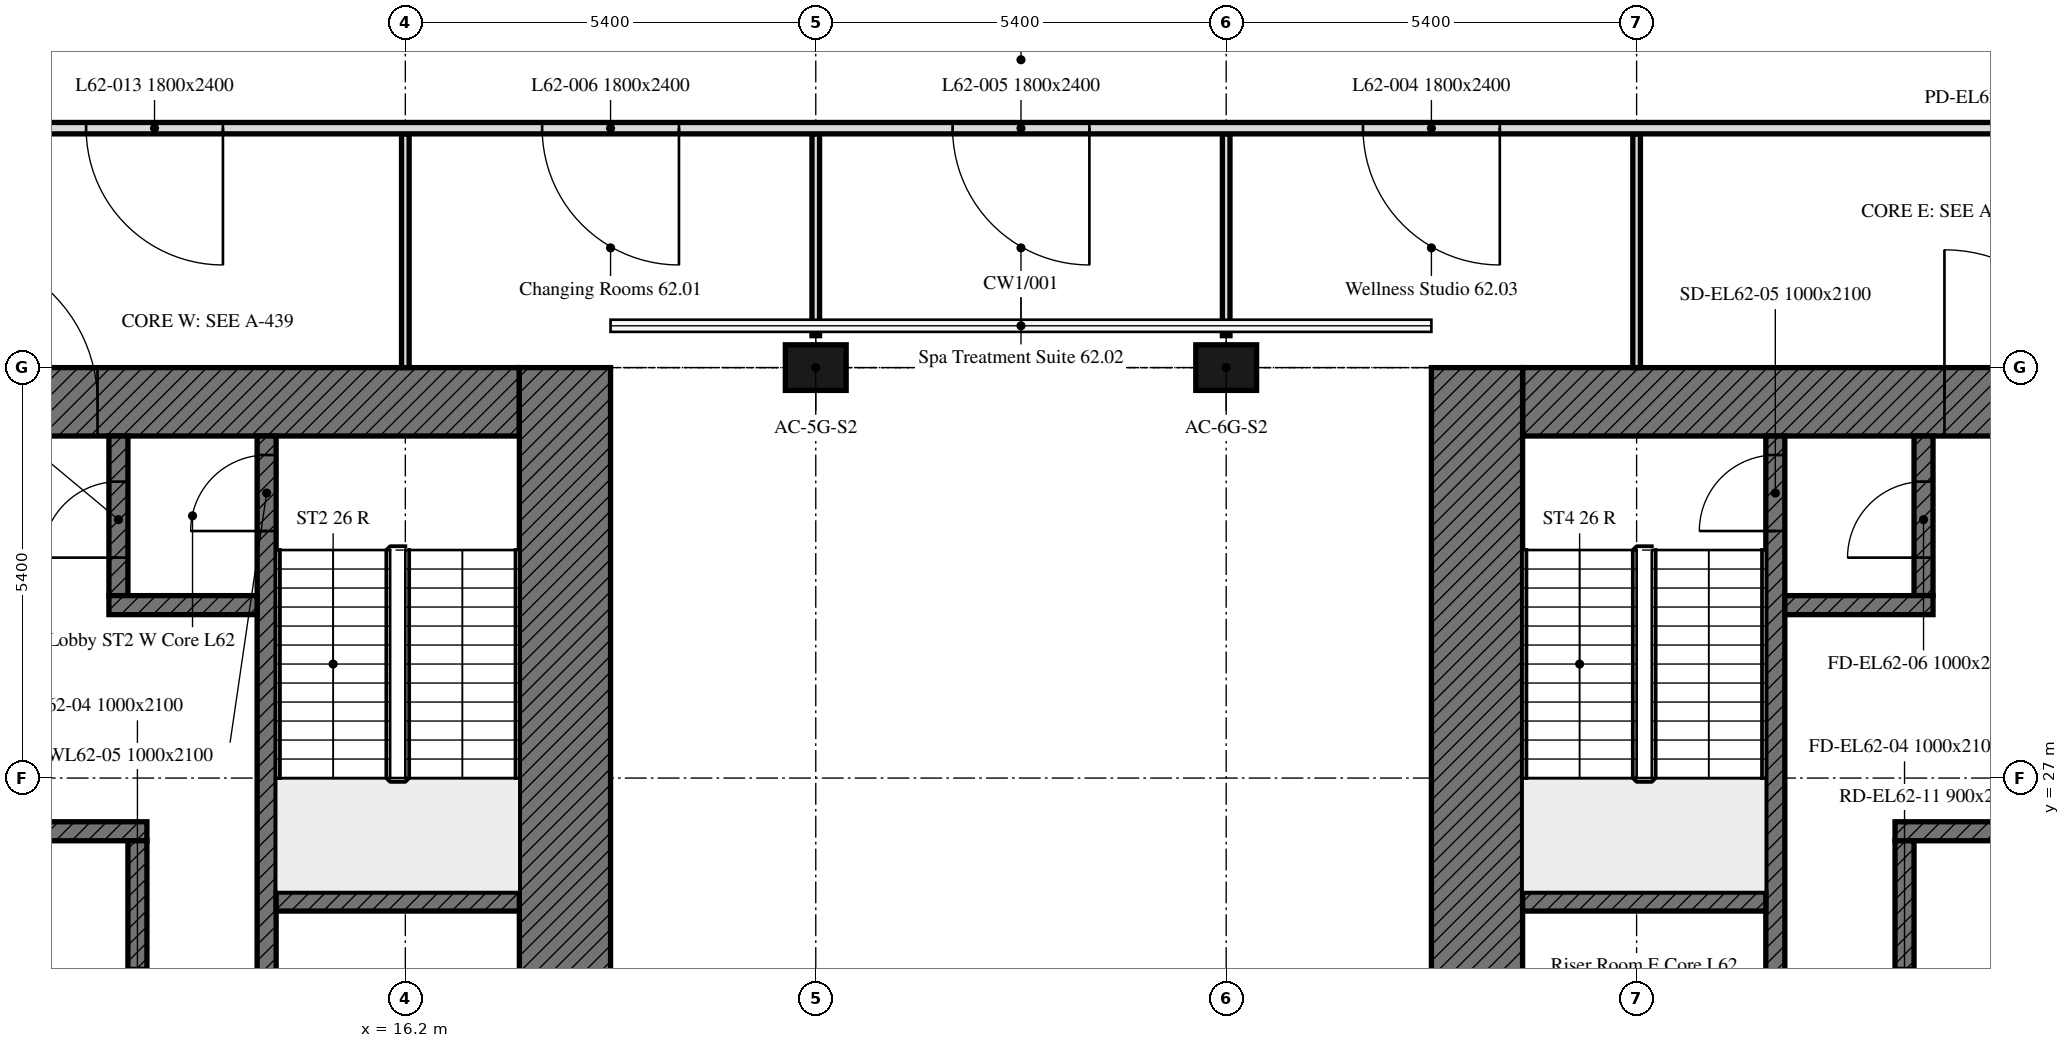
"""IFC4 building model, lengths in metres.
Left out: names, types, materials, properties, quantities, classifications, styles, units other than length and angle.
Written with IfcOpenShell. Run it as: python <this file> out.ifc"""

import sys

from ifc_helpers import new_model, si_unit, direction, frame, frame_2d, origin, origin_2d, place, context, subcontext, project, spatial, rectangle, extrude, element, fill, save


model = new_model("IFC4")
c1 = context("Model", 3, precision=1e-05, world=origin(), true_north=direction((0.0, 1.0)))
c2 = subcontext(c1, "Body", "Model", "MODEL_VIEW")
j1 = project(units=[si_unit("LENGTHUNIT", "METRE"), si_unit("PLANEANGLEUNIT", "RADIAN")], contexts=[c1])
p1 = place(None, origin())
s1 = spatial("IfcSite", under=j1, at=p1, CompositionType="ELEMENT")
p2 = place(p1, origin())
s2 = spatial("IfcBuilding", under=s1, at=p2, CompositionType="ELEMENT")
p3 = place(p2, frame((0.0, 0.0, 255.7)))
s3 = spatial("IfcBuildingStorey", under=s2, at=p3, CompositionType="ELEMENT", Elevation=255.7)
for number, where, z_axis, x_axis in (
    (1, (21.6, 32.4, 0.0), (0.0, 0.0, 1.0), (1.0, 0.0, 0.0)),
    (2, (27.0, 32.4, 0.0), (0.0, 0.0, 1.0), (1.0, 0.0, 0.0)),
):
    element("IfcColumn", number, at=place(p3, frame(where, z_axis=z_axis, x_axis=x_axis)), inside=s3, PredefinedType="COLUMN", context=c2, shape_type="SweptSolid", body=[
        extrude(rectangle(XDim=0.8, YDim=0.6, at=origin_2d()), origin(), (0.0, 0.0, 1.0), 4.5),
    ])
p4 = place(p3, frame((6.6, 31.95, 0.0), z_axis=(0.0, 0.0, 1.0), x_axis=(1.0, 0.0, 0.0)))
e3 = element("IfcWall", 3, at=p4, inside=s3, PredefinedType="SOLIDWALL", context=c2, shape_type="SweptSolid", body=[
    extrude(rectangle(XDim=11.1, YDim=0.9, at=frame_2d((5.55, 0.0))), origin(), (0.0, 0.0, 1.0), 4.5),
])
p5 = place(p4, frame((3.55, 0.0, 0.0)))
e4 = element("IfcOpeningElement", 4, at=p5, cuts=e3, PredefinedType="OPENING", context=c2, shape_type="SweptSolid", body=[
    extrude(rectangle(XDim=2.0, YDim=2.4, at=frame_2d((1.0, 1.2))), frame((0.0, 0.45, 0.0), z_axis=(0.0, -1.0, 0.0), x_axis=(1.0, 0.0, 0.0)), (0.0, 0.0, 1.0), 0.9),
])
p6 = place(p3, frame((18.3, 32.4, 0.0), z_axis=(0.0, 0.0, 1.0), x_axis=(0.0, -1.0, 0.0)))
e5 = element("IfcWall", 5, at=p6, inside=s3, PredefinedType="SOLIDWALL", context=c2, shape_type="SweptSolid", body=[
    extrude(rectangle(XDim=16.2, YDim=1.2, at=frame_2d((8.1, 0.0))), origin(), (0.0, 0.0, 1.0), 4.5),
])
p7 = place(p3, frame((14.375, 17.1, 0.0), z_axis=(0.0, 0.0, 1.0), x_axis=(0.0, 1.0, 0.0)))
e6 = element("IfcWall", 6, at=p7, inside=s3, PredefinedType="SOLIDWALL", context=c2, shape_type="SweptSolid", body=[
    extrude(rectangle(XDim=14.4, YDim=0.25, at=frame_2d((7.2, 0.0))), origin(), (0.0, 0.0, 1.0), 4.5),
])
p8 = place(p7, frame((13.15, 0.0, 0.0)))
e7 = element("IfcOpeningElement", 7, at=p8, cuts=e6, PredefinedType="OPENING", context=c2, shape_type="SweptSolid", body=[
    extrude(rectangle(XDim=1.0, YDim=2.1, at=frame_2d((0.5, 1.05))), frame((0.0, 0.125, 0.0), z_axis=(0.0, -1.0, 0.0), x_axis=(1.0, 0.0, 0.0)), (0.0, 0.0, 1.0), 0.25),
])
p9 = place(p7, frame((3.15, 0.0, 0.0)))
e8 = element("IfcOpeningElement", 8, at=p9, cuts=e6, PredefinedType="OPENING", context=c2, shape_type="SweptSolid", body=[
    extrude(rectangle(XDim=1.1, YDim=2.1, at=frame_2d((0.55, 1.05))), frame((0.0, 0.125, 0.0), z_axis=(0.0, -1.0, 0.0), x_axis=(1.0, 0.0, 0.0)), (0.0, 0.0, 1.0), 0.25),
])
p10 = place(p7, frame((0.7, 0.0, 0.0)))
e9 = element("IfcOpeningElement", 9, at=p10, cuts=e6, PredefinedType="OPENING", context=c2, shape_type="SweptSolid", body=[
    extrude(rectangle(XDim=0.9, YDim=2.1, at=frame_2d((0.45, 1.05))), frame((0.0, 0.125, 0.0), z_axis=(0.0, -1.0, 0.0), x_axis=(1.0, 0.0, 0.0)), (0.0, 0.0, 1.0), 0.25),
])
p11 = place(p7, frame((6.175, 0.0, 0.0)))
e10 = element("IfcOpeningElement", 10, at=p11, cuts=e6, PredefinedType="OPENING", context=c2, shape_type="SweptSolid", body=[
    extrude(rectangle(XDim=0.9, YDim=2.1, at=frame_2d((0.45, 1.05))), frame((0.0, 0.125, 0.0), z_axis=(0.0, -1.0, 0.0), x_axis=(1.0, 0.0, 0.0)), (0.0, 0.0, 1.0), 0.25),
])
p12 = place(p3, frame((14.5, 25.375, 0.0), z_axis=(0.0, 0.0, 1.0), x_axis=(1.0, 0.0, 0.0)))
e11 = element("IfcWall", 11, at=p12, inside=s3, PredefinedType="SOLIDWALL", context=c2, shape_type="SweptSolid", body=[
    extrude(rectangle(XDim=3.2, YDim=0.25, at=frame_2d((1.6, 0.0))), origin(), (0.0, 0.0, 1.0), 4.5),
])
p13 = place(p3, frame((10.05, 26.3, 0.0), z_axis=(0.0, 0.0, 1.0), x_axis=(1.0, 0.0, 0.0)))
e12 = element("IfcWall", 12, at=p13, inside=s3, PredefinedType="SOLIDWALL", context=c2, shape_type="SweptSolid", body=[
    extrude(rectangle(XDim=2.75, YDim=0.25, at=frame_2d((1.375, 0.0))), origin(), (0.0, 0.0, 1.0), 4.5),
])
p14 = place(p3, frame((12.425, 29.4, 0.0), z_axis=(0.0, 0.0, 1.0), x_axis=(0.0, 1.0, 0.0)))
e13 = element("IfcWall", 13, at=p14, inside=s3, PredefinedType="SOLIDWALL", context=c2, shape_type="SweptSolid", body=[
    extrude(rectangle(XDim=2.1, YDim=0.25, at=frame_2d((1.05, 0.0))), origin(), (0.0, 0.0, 1.0), 4.5),
])
p15 = place(p14, frame((0.5, 0.0, 0.0)))
e14 = element("IfcOpeningElement", 14, at=p15, cuts=e13, PredefinedType="OPENING", context=c2, shape_type="SweptSolid", body=[
    extrude(rectangle(XDim=1.0, YDim=2.1, at=frame_2d((0.5, 1.05))), frame((0.0, 0.125, 0.0), z_axis=(0.0, -1.0, 0.0), x_axis=(1.0, 0.0, 0.0)), (0.0, 0.0, 1.0), 0.25),
])
p16 = place(p3, frame((12.3, 29.275, 0.0), z_axis=(0.0, 0.0, 1.0), x_axis=(1.0, 0.0, 0.0)))
e15 = element("IfcWall", 15, at=p16, inside=s3, PredefinedType="SOLIDWALL", context=c2, shape_type="SweptSolid", body=[
    extrude(rectangle(XDim=1.95, YDim=0.25, at=frame_2d((0.975, 0.0))), origin(), (0.0, 0.0, 1.0), 4.5),
])
p17 = place(p3, frame((12.675, 20.55, 0.0), z_axis=(0.0, 0.0, 1.0), x_axis=(0.0, 1.0, 0.0)))
e16 = element("IfcWall", 16, at=p17, inside=s3, PredefinedType="SOLIDWALL", context=c2, shape_type="SweptSolid", body=[
    extrude(rectangle(XDim=5.625, YDim=0.25, at=frame_2d((2.812, 0.0))), origin(), (0.0, 0.0, 1.0), 4.5),
])
p18 = place(p17, frame((2.95, 0.0, 0.0)))
e17 = element("IfcOpeningElement", 17, at=p18, cuts=e16, PredefinedType="OPENING", context=c2, shape_type="SweptSolid", body=[
    extrude(rectangle(XDim=1.0, YDim=2.1, at=frame_2d((0.5, 1.05))), frame((0.0, 0.125, 0.0), z_axis=(0.0, -1.0, 0.0), x_axis=(1.0, 0.0, 0.0)), (0.0, 0.0, 1.0), 0.25),
])
p19 = place(p3, frame((30.9, 31.95, 0.0), z_axis=(0.0, 0.0, 1.0), x_axis=(1.0, 0.0, 0.0)))
e18 = element("IfcWall", 18, at=p19, inside=s3, PredefinedType="SOLIDWALL", context=c2, shape_type="SweptSolid", body=[
    extrude(rectangle(XDim=11.1, YDim=0.9, at=frame_2d((5.55, 0.0))), origin(), (0.0, 0.0, 1.0), 4.5),
])
p20 = place(p19, frame((5.55, 0.0, 0.0)))
e19 = element("IfcOpeningElement", 19, at=p20, cuts=e18, PredefinedType="OPENING", context=c2, shape_type="SweptSolid", body=[
    extrude(rectangle(XDim=2.0, YDim=2.4, at=frame_2d((1.0, 1.2))), frame((0.0, 0.45, 0.0), z_axis=(0.0, -1.0, 0.0), x_axis=(1.0, 0.0, 0.0)), (0.0, 0.0, 1.0), 0.9),
])
p21 = place(p3, frame((30.3, 16.2, 0.0), z_axis=(0.0, 0.0, 1.0), x_axis=(0.0, 1.0, 0.0)))
e20 = element("IfcWall", 20, at=p21, inside=s3, PredefinedType="SOLIDWALL", context=c2, shape_type="SweptSolid", body=[
    extrude(rectangle(XDim=16.2, YDim=1.2, at=frame_2d((8.1, 0.0))), origin(), (0.0, 0.0, 1.0), 4.5),
])
p22 = place(p3, frame((34.225, 17.1, 0.0), z_axis=(0.0, 0.0, 1.0), x_axis=(0.0, 1.0, 0.0)))
e21 = element("IfcWall", 21, at=p22, inside=s3, PredefinedType="SOLIDWALL", context=c2, shape_type="SweptSolid", body=[
    extrude(rectangle(XDim=14.4, YDim=0.25, at=frame_2d((7.2, 0.0))), origin(), (0.0, 0.0, 1.0), 4.5),
])
p23 = place(p22, frame((13.15, 0.0, 0.0)))
e22 = element("IfcOpeningElement", 22, at=p23, cuts=e21, PredefinedType="OPENING", context=c2, shape_type="SweptSolid", body=[
    extrude(rectangle(XDim=1.0, YDim=2.1, at=frame_2d((0.5, 1.05))), frame((0.0, 0.125, 0.0), z_axis=(0.0, -1.0, 0.0), x_axis=(1.0, 0.0, 0.0)), (0.0, 0.0, 1.0), 0.25),
])
p24 = place(p22, frame((3.15, 0.0, 0.0)))
e23 = element("IfcOpeningElement", 23, at=p24, cuts=e21, PredefinedType="OPENING", context=c2, shape_type="SweptSolid", body=[
    extrude(rectangle(XDim=1.1, YDim=2.1, at=frame_2d((0.55, 1.05))), frame((0.0, 0.125, 0.0), z_axis=(0.0, -1.0, 0.0), x_axis=(1.0, 0.0, 0.0)), (0.0, 0.0, 1.0), 0.25),
])
p25 = place(p22, frame((0.7, 0.0, 0.0)))
e24 = element("IfcOpeningElement", 24, at=p25, cuts=e21, PredefinedType="OPENING", context=c2, shape_type="SweptSolid", body=[
    extrude(rectangle(XDim=0.9, YDim=2.1, at=frame_2d((0.45, 1.05))), frame((0.0, 0.125, 0.0), z_axis=(0.0, -1.0, 0.0), x_axis=(1.0, 0.0, 0.0)), (0.0, 0.0, 1.0), 0.25),
])
p26 = place(p22, frame((6.175, 0.0, 0.0)))
e25 = element("IfcOpeningElement", 25, at=p26, cuts=e21, PredefinedType="OPENING", context=c2, shape_type="SweptSolid", body=[
    extrude(rectangle(XDim=0.9, YDim=2.1, at=frame_2d((0.45, 1.05))), frame((0.0, 0.125, 0.0), z_axis=(0.0, -1.0, 0.0), x_axis=(1.0, 0.0, 0.0)), (0.0, 0.0, 1.0), 0.25),
])
p27 = place(p3, frame((30.9, 25.375, 0.0), z_axis=(0.0, 0.0, 1.0), x_axis=(1.0, 0.0, 0.0)))
e26 = element("IfcWall", 26, at=p27, inside=s3, PredefinedType="SOLIDWALL", context=c2, shape_type="SweptSolid", body=[
    extrude(rectangle(XDim=3.2, YDim=0.25, at=frame_2d((1.6, 0.0))), origin(), (0.0, 0.0, 1.0), 4.5),
])
p28 = place(p3, frame((35.8, 26.3, 0.0), z_axis=(0.0, 0.0, 1.0), x_axis=(1.0, 0.0, 0.0)))
e27 = element("IfcWall", 27, at=p28, inside=s3, PredefinedType="SOLIDWALL", context=c2, shape_type="SweptSolid", body=[
    extrude(rectangle(XDim=2.75, YDim=0.25, at=frame_2d((1.375, 0.0))), origin(), (0.0, 0.0, 1.0), 4.5),
])
p29 = place(p3, frame((36.175, 29.4, 0.0), z_axis=(0.0, 0.0, 1.0), x_axis=(0.0, 1.0, 0.0)))
e28 = element("IfcWall", 28, at=p29, inside=s3, PredefinedType="SOLIDWALL", context=c2, shape_type="SweptSolid", body=[
    extrude(rectangle(XDim=2.1, YDim=0.25, at=frame_2d((1.05, 0.0))), origin(), (0.0, 0.0, 1.0), 4.5),
])
p30 = place(p29, frame((0.5, 0.0, 0.0)))
e29 = element("IfcOpeningElement", 29, at=p30, cuts=e28, PredefinedType="OPENING", context=c2, shape_type="SweptSolid", body=[
    extrude(rectangle(XDim=1.0, YDim=2.1, at=frame_2d((0.5, 1.05))), frame((0.0, 0.125, 0.0), z_axis=(0.0, -1.0, 0.0), x_axis=(1.0, 0.0, 0.0)), (0.0, 0.0, 1.0), 0.25),
])
p31 = place(p3, frame((34.35, 29.275, 0.0), z_axis=(0.0, 0.0, 1.0), x_axis=(1.0, 0.0, 0.0)))
e30 = element("IfcWall", 30, at=p31, inside=s3, PredefinedType="SOLIDWALL", context=c2, shape_type="SweptSolid", body=[
    extrude(rectangle(XDim=1.95, YDim=0.25, at=frame_2d((0.975, 0.0))), origin(), (0.0, 0.0, 1.0), 4.5),
])
p32 = place(p3, frame((35.925, 20.55, 0.0), z_axis=(0.0, 0.0, 1.0), x_axis=(0.0, 1.0, 0.0)))
e31 = element("IfcWall", 31, at=p32, inside=s3, PredefinedType="SOLIDWALL", context=c2, shape_type="SweptSolid", body=[
    extrude(rectangle(XDim=5.625, YDim=0.25, at=frame_2d((2.812, 0.0))), origin(), (0.0, 0.0, 1.0), 4.5),
])
p33 = place(p32, frame((2.95, 0.0, 0.0)))
e32 = element("IfcOpeningElement", 32, at=p33, cuts=e31, PredefinedType="OPENING", context=c2, shape_type="SweptSolid", body=[
    extrude(rectangle(XDim=1.0, YDim=2.1, at=frame_2d((0.5, 1.05))), frame((0.0, 0.125, 0.0), z_axis=(0.0, -1.0, 0.0), x_axis=(1.0, 0.0, 0.0)), (0.0, 0.0, 1.0), 0.25),
])
p34 = place(p3, frame((32.4, 32.4, 0.0), z_axis=(0.0, 0.0, 1.0), x_axis=(0.0, 1.0, 0.0)))
e33 = element("IfcWall", 33, at=p34, inside=s3, PredefinedType="PARTITIONING", context=c2, shape_type="SweptSolid", body=[
    extrude(rectangle(XDim=3.075, YDim=0.1, at=frame_2d((1.538, 0.0))), origin(), (0.0, 0.0, 1.0), 4.5),
])
for number, where, z_axis, x_axis in (
    (34, (27.0, 35.475, 0.0), (0.0, 0.0, 1.0), (0.0, -1.0, 0.0)),
    (35, (21.6, 35.475, 0.0), (0.0, 0.0, 1.0), (0.0, -1.0, 0.0)),
):
    element("IfcWall", number, at=place(p3, frame(where, z_axis=z_axis, x_axis=x_axis)), inside=s3, PredefinedType="PARTITIONING", context=c2, shape_type="SweptSolid", body=[
        extrude(rectangle(XDim=2.655, YDim=0.1, at=frame_2d((1.328, 0.0))), origin(), (0.0, 0.0, 1.0), 4.5),
    ])
p35 = place(p3, frame((16.2, 35.475, 0.0), z_axis=(0.0, 0.0, 1.0), x_axis=(0.0, -1.0, 0.0)))
e36 = element("IfcWall", 36, at=p35, inside=s3, PredefinedType="PARTITIONING", context=c2, shape_type="SweptSolid", body=[
    extrude(rectangle(XDim=3.075, YDim=0.1, at=frame_2d((1.538, 0.0))), origin(), (0.0, 0.0, 1.0), 4.5),
])
p36 = place(p3, frame((42.6, 35.55, 0.0), z_axis=(0.0, 0.0, 1.0), x_axis=(-1.0, 0.0, 0.0)))
e37 = element("IfcWall", 37, at=p36, inside=s3, PredefinedType="PARTITIONING", context=c2, shape_type="SweptSolid", body=[
    extrude(rectangle(XDim=36.6, YDim=0.15, at=frame_2d((18.3, 0.0))), origin(), (0.0, 0.0, 1.0), 4.5),
])
p37 = place(p36, frame((12.0, 0.0, 0.0)))
e38 = element("IfcOpeningElement", 38, at=p37, cuts=e37, PredefinedType="OPENING", context=c2, shape_type="SweptSolid", body=[
    extrude(rectangle(XDim=1.8, YDim=2.4, at=frame_2d((0.9, 1.2))), frame((0.0, 0.075, 0.0), z_axis=(0.0, -1.0, 0.0), x_axis=(1.0, 0.0, 0.0)), (0.0, 0.0, 1.0), 0.15),
])
p38 = place(p36, frame((17.4, 0.0, 0.0)))
e39 = element("IfcOpeningElement", 39, at=p38, cuts=e37, PredefinedType="OPENING", context=c2, shape_type="SweptSolid", body=[
    extrude(rectangle(XDim=1.8, YDim=2.4, at=frame_2d((0.9, 1.2))), frame((0.0, 0.075, 0.0), z_axis=(0.0, -1.0, 0.0), x_axis=(1.0, 0.0, 0.0)), (0.0, 0.0, 1.0), 0.15),
])
p39 = place(p36, frame((22.8, 0.0, 0.0)))
e40 = element("IfcOpeningElement", 40, at=p39, cuts=e37, PredefinedType="OPENING", context=c2, shape_type="SweptSolid", body=[
    extrude(rectangle(XDim=1.8, YDim=2.4, at=frame_2d((0.9, 1.2))), frame((0.0, 0.075, 0.0), z_axis=(0.0, -1.0, 0.0), x_axis=(1.0, 0.0, 0.0)), (0.0, 0.0, 1.0), 0.15),
])
p40 = place(p36, frame((1.8, 0.0, 0.0)))
e41 = element("IfcOpeningElement", 41, at=p40, cuts=e37, PredefinedType="OPENING", context=c2, shape_type="SweptSolid", body=[
    extrude(rectangle(XDim=1.8, YDim=2.4, at=frame_2d((0.9, 1.2))), frame((0.0, 0.075, 0.0), z_axis=(0.0, -1.0, 0.0), x_axis=(1.0, 0.0, 0.0)), (0.0, 0.0, 1.0), 0.15),
])
p41 = place(p36, frame((28.8, 0.0, 0.0)))
e42 = element("IfcOpeningElement", 42, at=p41, cuts=e37, PredefinedType="OPENING", context=c2, shape_type="SweptSolid", body=[
    extrude(rectangle(XDim=1.8, YDim=2.4, at=frame_2d((0.9, 1.2))), frame((0.0, 0.075, 0.0), z_axis=(0.0, -1.0, 0.0), x_axis=(1.0, 0.0, 0.0)), (0.0, 0.0, 1.0), 0.15),
])
p42 = place(p5, origin())
e43 = element("IfcDoor", 43, at=p42, inside=s3, OperationType="DOUBLE_DOOR_SINGLE_SWING", PredefinedType="DOOR", context=c2, shape_type="SweptSolid", body=[
    extrude(rectangle(XDim=2.0, YDim=2.4, at=frame_2d((1.0, 1.2))), frame((0.0, 0.025, 0.0), z_axis=(0.0, -1.0, 0.0), x_axis=(1.0, 0.0, 0.0)), (0.0, 0.0, 1.0), 0.05),
])
fill(e4, e43)
p43 = place(p8, origin())
e44 = element("IfcDoor", 44, at=p43, inside=s3, OperationType="SINGLE_SWING_LEFT", PredefinedType="DOOR", context=c2, shape_type="SweptSolid", body=[
    extrude(rectangle(XDim=1.0, YDim=2.1, at=frame_2d((0.5, 1.05))), frame((0.0, 0.025, 0.0), z_axis=(0.0, -1.0, 0.0), x_axis=(1.0, 0.0, 0.0)), (0.0, 0.0, 1.0), 0.05),
])
fill(e7, e44)
p44 = place(p15, origin())
e45 = element("IfcDoor", 45, at=p44, inside=s3, OperationType="SINGLE_SWING_LEFT", PredefinedType="DOOR", context=c2, shape_type="SweptSolid", body=[
    extrude(rectangle(XDim=1.0, YDim=2.1, at=frame_2d((0.5, 1.05))), frame((0.0, 0.025, 0.0), z_axis=(0.0, -1.0, 0.0), x_axis=(1.0, 0.0, 0.0)), (0.0, 0.0, 1.0), 0.05),
])
fill(e14, e45)
p45 = place(p20, origin())
e46 = element("IfcDoor", 46, at=p45, inside=s3, OperationType="DOUBLE_DOOR_SINGLE_SWING", PredefinedType="DOOR", context=c2, shape_type="SweptSolid", body=[
    extrude(rectangle(XDim=2.0, YDim=2.4, at=frame_2d((1.0, 1.2))), frame((0.0, 0.025, 0.0), z_axis=(0.0, -1.0, 0.0), x_axis=(1.0, 0.0, 0.0)), (0.0, 0.0, 1.0), 0.05),
])
fill(e19, e46)
p46 = place(p23, origin())
e47 = element("IfcDoor", 47, at=p46, inside=s3, OperationType="SINGLE_SWING_LEFT", PredefinedType="DOOR", context=c2, shape_type="SweptSolid", body=[
    extrude(rectangle(XDim=1.0, YDim=2.1, at=frame_2d((0.5, 1.05))), frame((0.0, 0.025, 0.0), z_axis=(0.0, -1.0, 0.0), x_axis=(1.0, 0.0, 0.0)), (0.0, 0.0, 1.0), 0.05),
])
fill(e22, e47)
p47 = place(p30, origin())
e48 = element("IfcDoor", 48, at=p47, inside=s3, OperationType="SINGLE_SWING_LEFT", PredefinedType="DOOR", context=c2, shape_type="SweptSolid", body=[
    extrude(rectangle(XDim=1.0, YDim=2.1, at=frame_2d((0.5, 1.05))), frame((0.0, 0.025, 0.0), z_axis=(0.0, -1.0, 0.0), x_axis=(1.0, 0.0, 0.0)), (0.0, 0.0, 1.0), 0.05),
])
fill(e29, e48)
p48 = place(p37, origin())
e49 = element("IfcDoor", 49, at=p48, inside=s3, OperationType="DOUBLE_DOOR_SINGLE_SWING", PredefinedType="DOOR", context=c2, shape_type="SweptSolid", body=[
    extrude(rectangle(XDim=1.8, YDim=2.4, at=frame_2d((0.9, 1.2))), frame((0.0, 0.025, 0.0), z_axis=(0.0, -1.0, 0.0), x_axis=(1.0, 0.0, 0.0)), (0.0, 0.0, 1.0), 0.05),
])
fill(e38, e49)
p49 = place(p38, origin())
e50 = element("IfcDoor", 50, at=p49, inside=s3, OperationType="DOUBLE_DOOR_SINGLE_SWING", PredefinedType="DOOR", context=c2, shape_type="SweptSolid", body=[
    extrude(rectangle(XDim=1.8, YDim=2.4, at=frame_2d((0.9, 1.2))), frame((0.0, 0.025, 0.0), z_axis=(0.0, -1.0, 0.0), x_axis=(1.0, 0.0, 0.0)), (0.0, 0.0, 1.0), 0.05),
])
fill(e39, e50)
p50 = place(p39, origin())
e51 = element("IfcDoor", 51, at=p50, inside=s3, OperationType="DOUBLE_DOOR_SINGLE_SWING", PredefinedType="DOOR", context=c2, shape_type="SweptSolid", body=[
    extrude(rectangle(XDim=1.8, YDim=2.4, at=frame_2d((0.9, 1.2))), frame((0.0, 0.025, 0.0), z_axis=(0.0, -1.0, 0.0), x_axis=(1.0, 0.0, 0.0)), (0.0, 0.0, 1.0), 0.05),
])
fill(e40, e51)
p51 = place(p41, origin())
e52 = element("IfcDoor", 52, at=p51, inside=s3, OperationType="DOUBLE_DOOR_SINGLE_SWING", PredefinedType="DOOR", context=c2, shape_type="SweptSolid", body=[
    extrude(rectangle(XDim=1.8, YDim=2.4, at=frame_2d((0.9, 1.2))), frame((0.0, 0.025, 0.0), z_axis=(0.0, -1.0, 0.0), x_axis=(1.0, 0.0, 0.0)), (0.0, 0.0, 1.0), 0.05),
])
fill(e42, e52)
save(model, sys.argv[1])
